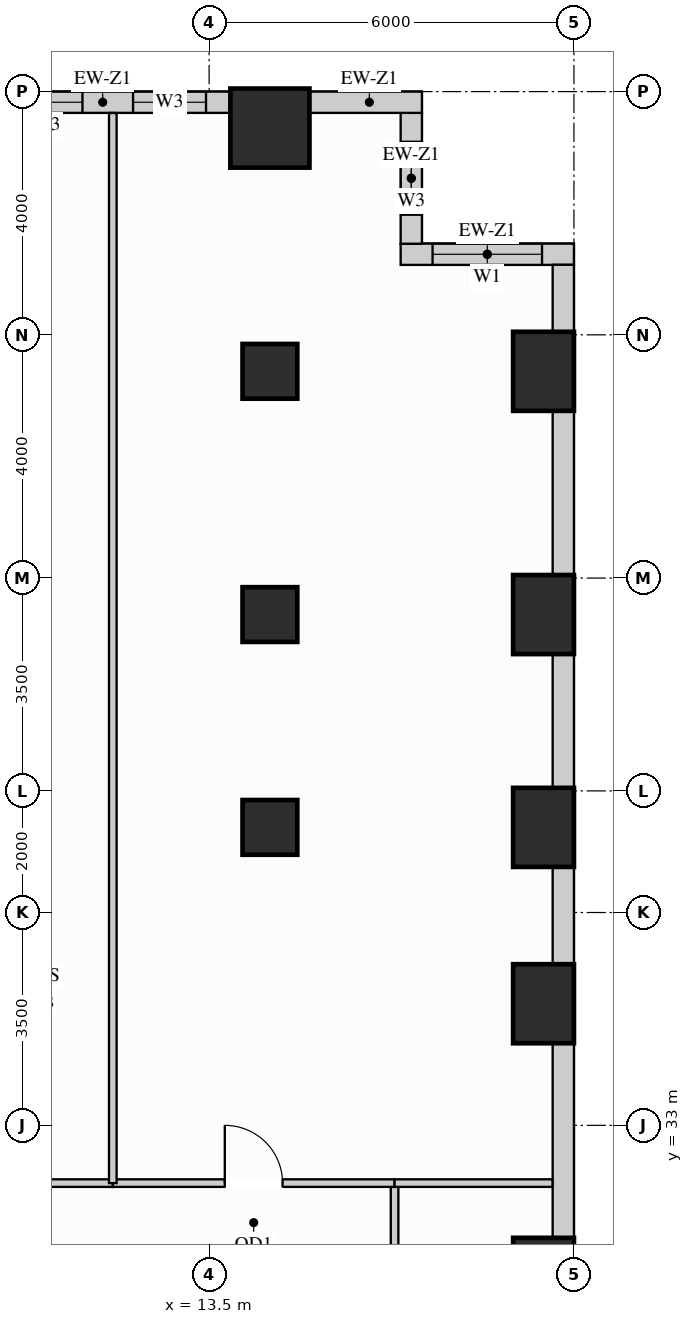
"""IFC4 building model, lengths in metres.
Left out: names, types, materials, properties, quantities, classifications, styles, units other than length and angle.
Written with IfcOpenShell. Run it as: python <this file> out.ifc"""

import sys

from ifc_helpers import new_model, si_unit, direction, frame, frame_2d, origin, origin_2d, place, context, subcontext, project, spatial, rectangle, extrude, source, transform, mapped, element, fill, save


model = new_model("IFC4")
c1 = context("Model", 3, precision=1e-05, world=origin(), true_north=direction((0.0, 1.0)))
c2 = subcontext(c1, "Body", "Model", "MODEL_VIEW")
j1 = project(units=[si_unit("LENGTHUNIT", "METRE"), si_unit("PLANEANGLEUNIT", "RADIAN")], contexts=[c1])
p1 = place(None, origin())
s1 = spatial("IfcSite", under=j1, at=p1, CompositionType="ELEMENT")
p2 = place(p1, origin())
s2 = spatial("IfcBuilding", under=s1, at=p2, CompositionType="ELEMENT")
p3 = place(p2, frame((0.0, 0.0, 36.9)))
s3 = spatial("IfcBuildingStorey", under=s2, at=p3, CompositionType="ELEMENT", Elevation=36.9)
m1 = source(origin(), c2, "Body", "SweptSolid", [
    extrude(rectangle(XDim=0.9, YDim=0.9, at=origin_2d()), origin(), (0.0, 0.0, 1.0), 3.38),
])
for number, where, z_axis, x_axis in (
    (1, (14.5, 37.9, 0.0), (0.0, 0.0, 1.0), (1.0, 0.0, 0.0)),
    (2, (14.5, 41.4, 0.0), (0.0, 0.0, 1.0), (1.0, 0.0, 0.0)),
    (3, (14.5, 45.4, 0.0), (0.0, 0.0, 1.0), (1.0, 0.0, 0.0)),
):
    element("IfcColumn", number, at=place(p3, frame(where, z_axis=z_axis, x_axis=x_axis)), inside=s3, PredefinedType="COLUMN", context=c2, shape_type="MappedRepresentation", body=[
        mapped(m1, transform((0.0, 0.0, 0.0), x_axis=(1.0, 0.0, 0.0), y_axis=(0.0, 1.0, 0.0), z_axis=(0.0, 0.0, 1.0))),
    ])
m2 = source(origin(), c2, "Body", "SweptSolid", [
    extrude(rectangle(XDim=1.0, YDim=1.3, at=origin_2d()), origin(), (0.0, 0.0, 1.0), 3.38),
])
for number, where, z_axis, x_axis in (
    (4, (19.0, 30.5, 0.0), (0.0, 0.0, 1.0), (1.0, 0.0, 0.0)),
    (5, (19.0, 35.0, 0.0), (0.0, 0.0, 1.0), (1.0, 0.0, 0.0)),
    (6, (19.0, 37.9, 0.0), (0.0, 0.0, 1.0), (1.0, 0.0, 0.0)),
    (7, (19.0, 41.4, 0.0), (0.0, 0.0, 1.0), (1.0, 0.0, 0.0)),
    (8, (19.0, 45.4, 0.0), (0.0, 0.0, 1.0), (1.0, 0.0, 0.0)),
):
    element("IfcColumn", number, at=place(p3, frame(where, z_axis=z_axis, x_axis=x_axis)), inside=s3, PredefinedType="COLUMN", context=c2, shape_type="MappedRepresentation", body=[
        mapped(m2, transform((0.0, 0.0, 0.0), x_axis=(1.0, 0.0, 0.0), y_axis=(0.0, 1.0, 0.0), z_axis=(0.0, 0.0, 1.0))),
    ])
m3 = source(origin(), c2, "Body", "SweptSolid", [
    extrude(rectangle(XDim=1.3, YDim=1.3, at=origin_2d()), origin(), (0.0, 0.0, 1.0), 3.38),
])
p4 = place(p3, frame((14.5, 49.4, 0.0), z_axis=(0.0, 0.0, 1.0), x_axis=(1.0, 0.0, 0.0)))
e9 = element("IfcColumn", 9, at=p4, inside=s3, PredefinedType="COLUMN", context=c2, shape_type="MappedRepresentation", body=[
    mapped(m3, transform((0.0, 0.0, 0.0), x_axis=(1.0, 0.0, 0.0), y_axis=(0.0, 1.0, 0.0), z_axis=(0.0, 0.0, 1.0))),
])
p5 = place(p3, frame((19.5, 47.325, 0.0), z_axis=(0.0, 0.0, 1.0), x_axis=(-1.0, 0.0, 0.0)))
e10 = element("IfcWall", 10, at=p5, inside=s3, PredefinedType="SOLIDWALL", context=c2, shape_type="SweptSolid", body=[
    extrude(rectangle(XDim=2.85, YDim=0.35, at=frame_2d((1.425, 0.0))), origin(), (0.0, 0.0, 1.0), 3.365),
])
p6 = place(p5, frame((0.525, 0.0, 0.78)))
e11 = element("IfcOpeningElement", 11, at=p6, cuts=e10, PredefinedType="OPENING", context=c2, shape_type="SweptSolid", body=[
    extrude(rectangle(XDim=1.8, YDim=2.1, at=frame_2d((0.9, 1.05))), frame((0.0, 0.185, 0.0), z_axis=(0.0, -1.0, 0.0), x_axis=(1.0, 0.0, 0.0)), (0.0, 0.0, 1.0), 0.37),
])
p7 = place(p3, frame((16.825, 47.498, 0.0), z_axis=(0.0, 0.0, 1.0), x_axis=(0.0, 1.0, 0.0)))
e12 = element("IfcWall", 12, at=p7, inside=s3, PredefinedType="SOLIDWALL", context=c2, shape_type="SweptSolid", body=[
    extrude(rectangle(XDim=2.154, YDim=0.35, at=frame_2d((1.077, 0.0))), origin(), (0.0, 0.0, 1.0), 3.365),
])
p8 = place(p7, frame((0.477, 0.0, 0.78)))
e13 = element("IfcOpeningElement", 13, at=p8, cuts=e12, PredefinedType="OPENING", context=c2, shape_type="SweptSolid", body=[
    extrude(rectangle(XDim=1.2, YDim=2.1, at=frame_2d((0.6, 1.05))), frame((0.0, 0.185, 0.0), z_axis=(0.0, -1.0, 0.0), x_axis=(1.0, 0.0, 0.0)), (0.0, 0.0, 1.0), 0.37),
])
m4 = source(origin(), c2, "Body", "SweptSolid", [
    extrude(rectangle(XDim=1.852, YDim=0.35, at=frame_2d((0.926, 0.0))), origin(), (0.0, 0.0, 1.0), 3.365),
])
p9 = place(p3, frame((17.0, 49.825, 0.0), z_axis=(0.0, 0.0, 1.0), x_axis=(-1.0, 0.0, 0.0)))
e14 = element("IfcWall", 14, at=p9, inside=s3, PredefinedType="SOLIDWALL", context=c2, shape_type="MappedRepresentation", body=[
    mapped(m4, transform((0.0, 0.0, 0.0), x_axis=(1.0, 0.0, 0.0), y_axis=(0.0, 1.0, 0.0), z_axis=(0.0, 0.0, 1.0))),
])
p10 = place(p3, frame((13.852, 49.825, 0.0), z_axis=(0.0, 0.0, 1.0), x_axis=(-1.0, 0.0, 0.0)))
e15 = element("IfcWall", 15, at=p10, inside=s3, PredefinedType="SOLIDWALL", context=c2, shape_type="SweptSolid", body=[
    extrude(rectangle(XDim=4.204, YDim=0.35, at=frame_2d((2.102, 0.0))), origin(), (0.0, 0.0, 1.0), 2.51),
])
p11 = place(p10, frame((0.403, 0.0, 0.78)))
e16 = element("IfcOpeningElement", 16, at=p11, cuts=e15, PredefinedType="OPENING", context=c2, shape_type="SweptSolid", body=[
    extrude(rectangle(XDim=1.2, YDim=1.55, at=frame_2d((0.6, 0.775))), frame((0.0, 0.185, 0.0), z_axis=(0.0, -1.0, 0.0), x_axis=(1.0, 0.0, 0.0)), (0.0, 0.0, 1.0), 0.37),
])
p12 = place(p10, frame((2.435, 0.0, 0.78)))
e17 = element("IfcOpeningElement", 17, at=p12, cuts=e15, PredefinedType="OPENING", context=c2, shape_type="SweptSolid", body=[
    extrude(rectangle(XDim=1.2, YDim=1.55, at=frame_2d((0.6, 0.775))), frame((0.0, 0.185, 0.0), z_axis=(0.0, -1.0, 0.0), x_axis=(1.0, 0.0, 0.0)), (0.0, 0.0, 1.0), 0.37),
])
m5 = source(origin(), c2, "Body", "SweptSolid", [
    extrude(rectangle(XDim=3.204, YDim=0.35, at=frame_2d((1.602, 0.0))), origin(), (0.0, 0.0, 1.0), 2.51),
])
p13 = place(p3, frame((19.325, 31.148, 0.0), z_axis=(0.0, 0.0, 1.0), x_axis=(0.0, 1.0, 0.0)))
e18 = element("IfcWall", 18, at=p13, inside=s3, PredefinedType="SOLIDWALL", context=c2, shape_type="MappedRepresentation", body=[
    mapped(m5, transform((0.0, 0.0, 0.0), x_axis=(1.0, 0.0, 0.0), y_axis=(0.0, 1.0, 0.0), z_axis=(0.0, 0.0, 1.0))),
])
m6 = source(origin(), c2, "Body", "SweptSolid", [
    extrude(rectangle(XDim=1.604, YDim=0.35, at=frame_2d((0.802, 0.0))), origin(), (0.0, 0.0, 1.0), 2.51),
])
p14 = place(p3, frame((19.325, 35.648, 0.0), z_axis=(0.0, 0.0, 1.0), x_axis=(0.0, 1.0, 0.0)))
e19 = element("IfcWall", 19, at=p14, inside=s3, PredefinedType="SOLIDWALL", context=c2, shape_type="MappedRepresentation", body=[
    mapped(m6, transform((0.0, 0.0, 0.0), x_axis=(1.0, 0.0, 0.0), y_axis=(0.0, 1.0, 0.0), z_axis=(0.0, 0.0, 1.0))),
])
m7 = source(origin(), c2, "Body", "SweptSolid", [
    extrude(rectangle(XDim=2.204, YDim=0.35, at=frame_2d((1.102, 0.0))), origin(), (0.0, 0.0, 1.0), 2.51),
])
p15 = place(p3, frame((19.325, 38.548, 0.0), z_axis=(0.0, 0.0, 1.0), x_axis=(0.0, 1.0, 0.0)))
e20 = element("IfcWall", 20, at=p15, inside=s3, PredefinedType="SOLIDWALL", context=c2, shape_type="MappedRepresentation", body=[
    mapped(m7, transform((0.0, 0.0, 0.0), x_axis=(1.0, 0.0, 0.0), y_axis=(0.0, 1.0, 0.0), z_axis=(0.0, 0.0, 1.0))),
])
m8 = source(origin(), c2, "Body", "SweptSolid", [
    extrude(rectangle(XDim=2.704, YDim=0.35, at=frame_2d((1.352, 0.0))), origin(), (0.0, 0.0, 1.0), 2.51),
])
p16 = place(p3, frame((19.325, 42.048, 0.0), z_axis=(0.0, 0.0, 1.0), x_axis=(0.0, 1.0, 0.0)))
e21 = element("IfcWall", 21, at=p16, inside=s3, PredefinedType="SOLIDWALL", context=c2, shape_type="MappedRepresentation", body=[
    mapped(m8, transform((0.0, 0.0, 0.0), x_axis=(1.0, 0.0, 0.0), y_axis=(0.0, 1.0, 0.0), z_axis=(0.0, 0.0, 1.0))),
])
m9 = source(origin(), c2, "Body", "SweptSolid", [
    extrude(rectangle(XDim=1.104, YDim=0.35, at=frame_2d((0.552, 0.0))), origin(), (0.0, 0.0, 1.0), 3.365),
])
p17 = place(p3, frame((19.325, 46.048, 0.0), z_axis=(0.0, 0.0, 1.0), x_axis=(0.0, 1.0, 0.0)))
e22 = element("IfcWall", 22, at=p17, inside=s3, PredefinedType="SOLIDWALL", context=c2, shape_type="MappedRepresentation", body=[
    mapped(m9, transform((0.0, 0.0, 0.0), x_axis=(1.0, 0.0, 0.0), y_axis=(0.0, 1.0, 0.0), z_axis=(0.0, 0.0, 1.0))),
])
p18 = place(p3, frame((16.55, 26.05, 0.0), z_axis=(0.0, 0.0, 1.0), x_axis=(0.0, 1.0, 0.0)))
e23 = element("IfcWall", 23, at=p18, inside=s3, PredefinedType="PARTITIONING", context=c2, shape_type="SweptSolid", body=[
    extrude(rectangle(XDim=6.0, YDim=0.125, at=frame_2d((3.0, 0.0))), origin(), (0.0, 0.0, 1.0), 3.365),
])
p19 = place(p18, frame((2.525, 0.0, 0.0)))
e24 = element("IfcOpeningElement", 24, at=p19, cuts=e23, PredefinedType="OPENING", context=c2, shape_type="SweptSolid", body=[
    extrude(rectangle(XDim=0.95, YDim=2.15, at=frame_2d((0.475, 1.075))), frame((0.0, 0.073, 0.0), z_axis=(0.0, -1.0, 0.0), x_axis=(1.0, 0.0, 0.0)), (0.0, 0.0, 1.0), 0.145),
])
p20 = place(p3, frame((7.121, 32.05, 0.0), z_axis=(0.0, 0.0, 1.0), x_axis=(1.0, 0.0, 0.0)))
e25 = element("IfcWall", 25, at=p20, inside=s3, PredefinedType="PARTITIONING", context=c2, shape_type="SweptSolid", body=[
    extrude(rectangle(XDim=4.795, YDim=0.125, at=frame_2d((2.397, 0.0))), origin(), (0.0, 0.0, 1.0), 3.365),
])
p21 = place(p20, frame((1.923, 0.0, 0.0)))
e26 = element("IfcOpeningElement", 26, at=p21, cuts=e25, PredefinedType="OPENING", context=c2, shape_type="SweptSolid", body=[
    extrude(rectangle(XDim=0.95, YDim=2.15, at=frame_2d((0.475, 1.075))), frame((0.0, 0.073, 0.0), z_axis=(0.0, -1.0, 0.0), x_axis=(1.0, 0.0, 0.0)), (0.0, 0.0, 1.0), 0.145),
])
p22 = place(p3, frame((11.916, 32.05, 0.0), z_axis=(0.0, 0.0, 1.0), x_axis=(1.0, 0.0, 0.0)))
e27 = element("IfcWall", 27, at=p22, inside=s3, PredefinedType="PARTITIONING", context=c2, shape_type="SweptSolid", body=[
    extrude(rectangle(XDim=4.634, YDim=0.125, at=frame_2d((2.317, 0.0))), origin(), (0.0, 0.0, 1.0), 3.365),
])
p23 = place(p22, frame((1.842, 0.0, 0.0)))
e28 = element("IfcOpeningElement", 28, at=p23, cuts=e27, PredefinedType="OPENING", context=c2, shape_type="SweptSolid", body=[
    extrude(rectangle(XDim=0.95, YDim=2.15, at=frame_2d((0.475, 1.075))), frame((0.0, 0.073, 0.0), z_axis=(0.0, -1.0, 0.0), x_axis=(1.0, 0.0, 0.0)), (0.0, 0.0, 1.0), 0.145),
])
m10 = source(origin(), c2, "Body", "SweptSolid", [
    extrude(rectangle(XDim=2.598, YDim=0.125, at=frame_2d((1.299, 0.0))), origin(), (0.0, 0.0, 1.0), 3.365),
])
p24 = place(p3, frame((16.55, 32.05, 0.0), z_axis=(0.0, 0.0, 1.0), x_axis=(1.0, 0.0, 0.0)))
e29 = element("IfcWall", 29, at=p24, inside=s3, PredefinedType="PARTITIONING", context=c2, shape_type="MappedRepresentation", body=[
    mapped(m10, transform((0.0, 0.0, 0.0), x_axis=(1.0, 0.0, 0.0), y_axis=(0.0, 1.0, 0.0), z_axis=(0.0, 0.0, 1.0))),
])
m11 = source(origin(), c2, "Body", "SweptSolid", [
    extrude(rectangle(XDim=17.598, YDim=0.125, at=frame_2d((8.799, 0.0))), origin(), (0.0, 0.0, 1.0), 3.365),
])
p25 = place(p3, frame((11.916, 32.05, 0.0), z_axis=(0.0, 0.0, 1.0), x_axis=(0.0, 1.0, 0.0)))
e30 = element("IfcWall", 30, at=p25, inside=s3, PredefinedType="PARTITIONING", context=c2, shape_type="MappedRepresentation", body=[
    mapped(m11, transform((0.0, 0.0, 0.0), x_axis=(1.0, 0.0, 0.0), y_axis=(0.0, 1.0, 0.0), z_axis=(0.0, 0.0, 1.0))),
])
m12 = source(origin(), c2, "Body", "SweptSolid", [
    extrude(rectangle(XDim=0.95, YDim=2.15, at=frame_2d((0.475, 1.075))), frame((0.0, 0.025, 0.0), z_axis=(0.0, -1.0, 0.0), x_axis=(1.0, 0.0, 0.0)), (0.0, 0.0, 1.0), 0.05),
])
p26 = place(p23, origin())
e31 = element("IfcDoor", 31, at=p26, inside=s3, OperationType="SINGLE_SWING_LEFT", PredefinedType="DOOR", context=c2, shape_type="MappedRepresentation", body=[
    mapped(m12, transform((0.0, 0.0, 0.0), x_axis=(1.0, 0.0, 0.0), y_axis=(0.0, 1.0, 0.0), z_axis=(0.0, 0.0, 1.0))),
])
fill(e28, e31)
m13 = source(origin(), c2, "Body", "SweptSolid", [
    extrude(rectangle(XDim=1.8, YDim=2.1, at=frame_2d((0.9, 1.05))), frame((0.0, 0.03, 0.0), z_axis=(0.0, -1.0, 0.0), x_axis=(1.0, 0.0, 0.0)), (0.0, 0.0, 1.0), 0.06),
])
p27 = place(p6, origin())
e32 = element("IfcWindow", 32, at=p27, inside=s3, PartitioningType="SINGLE_PANEL", PredefinedType="WINDOW", context=c2, shape_type="MappedRepresentation", body=[
    mapped(m13, transform((0.0, 0.0, 0.0), x_axis=(1.0, 0.0, 0.0), y_axis=(0.0, 1.0, 0.0), z_axis=(0.0, 0.0, 1.0))),
])
fill(e11, e32)
m14 = source(origin(), c2, "Body", "SweptSolid", [
    extrude(rectangle(XDim=1.2, YDim=2.1, at=frame_2d((0.6, 1.05))), frame((0.0, 0.03, 0.0), z_axis=(0.0, -1.0, 0.0), x_axis=(1.0, 0.0, 0.0)), (0.0, 0.0, 1.0), 0.06),
])
p28 = place(p8, origin())
e33 = element("IfcWindow", 33, at=p28, inside=s3, PartitioningType="SINGLE_PANEL", PredefinedType="WINDOW", context=c2, shape_type="MappedRepresentation", body=[
    mapped(m14, transform((0.0, 0.0, 0.0), x_axis=(1.0, 0.0, 0.0), y_axis=(0.0, 1.0, 0.0), z_axis=(0.0, 0.0, 1.0))),
])
fill(e13, e33)
m15 = source(origin(), c2, "Body", "SweptSolid", [
    extrude(rectangle(XDim=1.2, YDim=1.55, at=frame_2d((0.6, 0.775))), frame((0.0, 0.03, 0.0), z_axis=(0.0, -1.0, 0.0), x_axis=(1.0, 0.0, 0.0)), (0.0, 0.0, 1.0), 0.06),
])
p29 = place(p11, origin())
e34 = element("IfcWindow", 34, at=p29, inside=s3, PartitioningType="SINGLE_PANEL", PredefinedType="WINDOW", context=c2, shape_type="MappedRepresentation", body=[
    mapped(m15, transform((0.0, 0.0, 0.0), x_axis=(1.0, 0.0, 0.0), y_axis=(0.0, 1.0, 0.0), z_axis=(0.0, 0.0, 1.0))),
])
fill(e16, e34)
p30 = place(p12, origin())
e35 = element("IfcWindow", 35, at=p30, inside=s3, PartitioningType="SINGLE_PANEL", PredefinedType="WINDOW", context=c2, shape_type="MappedRepresentation", body=[
    mapped(m15, transform((0.0, 0.0, 0.0), x_axis=(1.0, 0.0, 0.0), y_axis=(0.0, 1.0, 0.0), z_axis=(0.0, 0.0, 1.0))),
])
fill(e17, e35)
save(model, sys.argv[1])
